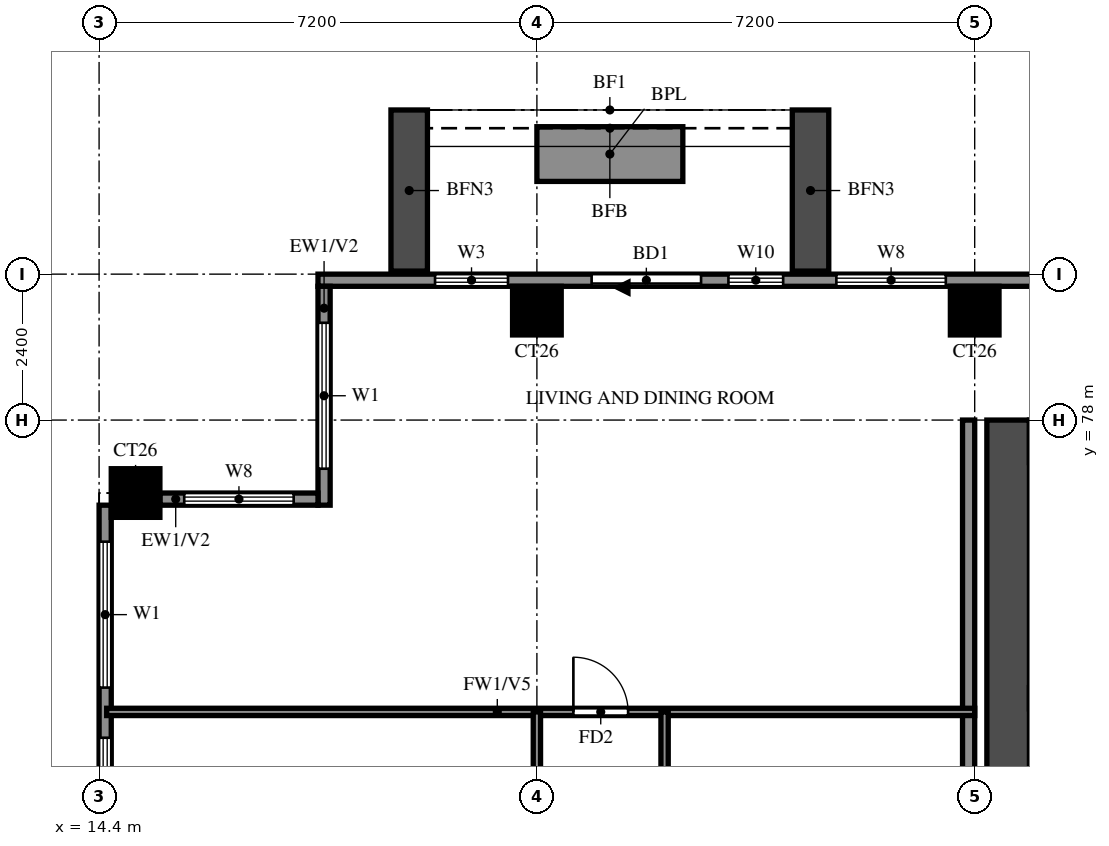
"""IFC4 building model, lengths in metres.
Left out: names, types, materials, properties, quantities, classifications, styles, units other than length and angle.
Written with IfcOpenShell. Run it as: python <this file> out.ifc"""

import sys

from ifc_helpers import new_model, si_unit, direction, frame, frame_2d, origin, origin_2d, place, context, subcontext, project, spatial, rectangle, extrude, source, transform, mapped, element, fill, save


model = new_model("IFC4")
c1 = context("Model", 3, precision=1e-05, world=origin(), true_north=direction((0.0, 1.0)))
c2 = subcontext(c1, "Body", "Model", "MODEL_VIEW")
j1 = project(units=[si_unit("LENGTHUNIT", "METRE"), si_unit("PLANEANGLEUNIT", "RADIAN")], contexts=[c1])
p1 = place(None, origin())
s1 = spatial("IfcSite", under=j1, at=p1, CompositionType="ELEMENT")
p2 = place(p1, origin())
s2 = spatial("IfcBuilding", under=s1, at=p2, CompositionType="ELEMENT")
p3 = place(p2, frame((0.0, 0.0, 195.5)))
s3 = spatial("IfcBuildingStorey", under=s2, at=p3, CompositionType="ELEMENT", Elevation=195.5)
m1 = source(origin(), c2, "Body", "SweptSolid", [
    extrude(rectangle(XDim=0.8, YDim=0.8, at=origin_2d()), origin(), (0.0, 0.0, 1.0), 3.2),
])
for number, where, z_axis, x_axis in (
    (1, (15.0, 76.8, 0.0), (0.0, 0.0, 1.0), (1.0, 0.0, 0.0)),
    (2, (21.6, 79.8, 0.0), (0.0, 0.0, 1.0), (1.0, 0.0, 0.0)),
    (3, (28.8, 79.8, 0.0), (0.0, 0.0, 1.0), (1.0, 0.0, 0.0)),
):
    element("IfcColumn", number, at=place(p3, frame(where, z_axis=z_axis, x_axis=x_axis)), inside=s3, PredefinedType="COLUMN", context=c2, shape_type="MappedRepresentation", body=[
        mapped(m1, transform((0.0, 0.0, 0.0))),
    ])
p4 = place(p3, frame((29.35, 66.1, 0.0), z_axis=(0.0, 0.0, 1.0), x_axis=(0.0, 1.0, 0.0)))
e4 = element("IfcWall", 4, at=p4, inside=s3, PredefinedType="SHEAR", context=c2, shape_type="SweptSolid", body=[
    extrude(rectangle(XDim=11.9, YDim=0.7, at=frame_2d((5.95, 0.0))), origin(), (0.0, 0.0, 1.0), 3.2),
])
p5 = place(p3, frame((82.6, 80.3, 0.0), z_axis=(0.0, 0.0, 1.0), x_axis=(-1.0, 0.0, 0.0)))
e5 = element("IfcWall", 5, at=p5, inside=s3, PredefinedType="SOLIDWALL", context=c2, shape_type="SweptSolid", body=[
    extrude(rectangle(XDim=64.6, YDim=0.2, at=frame_2d((32.3, 0.0))), origin(), (0.0, 0.0, 1.0), 3.2),
])
p6 = place(p5, frame((58.3, 0.0, 0.0)))
e6 = element("IfcOpeningElement", 6, at=p6, cuts=e5, PredefinedType="OPENING", context=c2, shape_type="SweptSolid", body=[
    extrude(rectangle(XDim=1.8, YDim=2.4, at=frame_2d((0.9, 1.2))), frame((0.0, 0.11, 0.0), z_axis=(0.0, -1.0, 0.0), x_axis=(1.0, 0.0, 0.0)), (0.0, 0.0, 1.0), 0.22),
])
p7 = place(p5, frame((54.275, 0.0, 0.6)))
e7 = element("IfcOpeningElement", 7, at=p7, cuts=e5, PredefinedType="OPENING", context=c2, shape_type="SweptSolid", body=[
    extrude(rectangle(XDim=1.8, YDim=2.4, at=frame_2d((0.9, 1.2))), frame((0.0, 0.11, 0.0), z_axis=(0.0, -1.0, 0.0), x_axis=(1.0, 0.0, 0.0)), (0.0, 0.0, 1.0), 0.22),
])
p8 = place(p5, frame((56.95, 0.0, 0.6)))
e8 = element("IfcOpeningElement", 8, at=p8, cuts=e5, PredefinedType="OPENING", context=c2, shape_type="SweptSolid", body=[
    extrude(rectangle(XDim=0.9, YDim=2.4, at=frame_2d((0.45, 1.2))), frame((0.0, 0.11, 0.0), z_axis=(0.0, -1.0, 0.0), x_axis=(1.0, 0.0, 0.0)), (0.0, 0.0, 1.0), 0.22),
])
p9 = place(p5, frame((61.475, 0.0, 0.6)))
e9 = element("IfcOpeningElement", 9, at=p9, cuts=e5, PredefinedType="OPENING", context=c2, shape_type="SweptSolid", body=[
    extrude(rectangle(XDim=1.2, YDim=2.4, at=frame_2d((0.6, 1.2))), frame((0.0, 0.11, 0.0), z_axis=(0.0, -1.0, 0.0), x_axis=(1.0, 0.0, 0.0)), (0.0, 0.0, 1.0), 0.22),
])
p10 = place(p5, frame((0.725, 0.0, 0.6)))
e10 = element("IfcOpeningElement", 10, at=p10, cuts=e5, PredefinedType="OPENING", context=c2, shape_type="SweptSolid", body=[
    extrude(rectangle(XDim=1.8, YDim=2.4, at=frame_2d((0.9, 1.2))), frame((0.0, 0.11, 0.0), z_axis=(0.0, -1.0, 0.0), x_axis=(1.0, 0.0, 0.0)), (0.0, 0.0, 1.0), 0.22),
])
p11 = place(p5, frame((4.35, 0.0, 0.6)))
e11 = element("IfcOpeningElement", 11, at=p11, cuts=e5, PredefinedType="OPENING", context=c2, shape_type="SweptSolid", body=[
    extrude(rectangle(XDim=2.4, YDim=2.4, at=frame_2d((1.2, 1.2))), frame((0.0, 0.11, 0.0), z_axis=(0.0, -1.0, 0.0), x_axis=(1.0, 0.0, 0.0)), (0.0, 0.0, 1.0), 0.22),
])
p12 = place(p5, frame((7.25, 0.0, 0.6)))
e12 = element("IfcOpeningElement", 12, at=p12, cuts=e5, PredefinedType="OPENING", context=c2, shape_type="SweptSolid", body=[
    extrude(rectangle(XDim=2.4, YDim=2.4, at=frame_2d((1.2, 1.2))), frame((0.0, 0.11, 0.0), z_axis=(0.0, -1.0, 0.0), x_axis=(1.0, 0.0, 0.0)), (0.0, 0.0, 1.0), 0.22),
])
p13 = place(p3, frame((18.1, 80.2, 0.0), z_axis=(0.0, 0.0, 1.0), x_axis=(0.0, -1.0, 0.0)))
e13 = element("IfcWall", 13, at=p13, inside=s3, PredefinedType="SOLIDWALL", context=c2, shape_type="SweptSolid", body=[
    extrude(rectangle(XDim=3.6, YDim=0.2, at=frame_2d((1.8, 0.0))), origin(), (0.0, 0.0, 1.0), 3.2),
])
p14 = place(p13, frame((0.6, 0.0, 0.6)))
e14 = element("IfcOpeningElement", 14, at=p14, cuts=e13, PredefinedType="OPENING", context=c2, shape_type="SweptSolid", body=[
    extrude(rectangle(XDim=2.4, YDim=2.4, at=frame_2d((1.2, 1.2))), frame((0.0, 0.11, 0.0), z_axis=(0.0, -1.0, 0.0), x_axis=(1.0, 0.0, 0.0)), (0.0, 0.0, 1.0), 0.22),
])
p15 = place(p3, frame((18.0, 76.7, 0.0), z_axis=(0.0, 0.0, 1.0), x_axis=(-1.0, 0.0, 0.0)))
e15 = element("IfcWall", 15, at=p15, inside=s3, PredefinedType="SOLIDWALL", context=c2, shape_type="SweptSolid", body=[
    extrude(rectangle(XDim=2.6, YDim=0.2, at=frame_2d((1.3, 0.0))), origin(), (0.0, 0.0, 1.0), 3.2),
])
p16 = place(p15, frame((0.4, 0.0, 0.6)))
e16 = element("IfcOpeningElement", 16, at=p16, cuts=e15, PredefinedType="OPENING", context=c2, shape_type="SweptSolid", body=[
    extrude(rectangle(XDim=1.8, YDim=2.4, at=frame_2d((0.9, 1.2))), frame((0.0, 0.11, 0.0), z_axis=(0.0, -1.0, 0.0), x_axis=(1.0, 0.0, 0.0)), (0.0, 0.0, 1.0), 0.22),
])
p17 = place(p3, frame((14.5, 76.6, 0.0), z_axis=(0.0, 0.0, 1.0), x_axis=(0.0, -1.0, 0.0)))
e17 = element("IfcWall", 17, at=p17, inside=s3, PredefinedType="SOLIDWALL", context=c2, shape_type="SweptSolid", body=[
    extrude(rectangle(XDim=7.0, YDim=0.2, at=frame_2d((3.5, 0.0))), origin(), (0.0, 0.0, 1.0), 3.2),
])
p18 = place(p17, frame((3.825, 0.0, 0.6)))
e18 = element("IfcOpeningElement", 18, at=p18, cuts=e17, PredefinedType="OPENING", context=c2, shape_type="SweptSolid", body=[
    extrude(rectangle(XDim=2.4, YDim=2.4, at=frame_2d((1.2, 1.2))), frame((0.0, 0.11, 0.0), z_axis=(0.0, -1.0, 0.0), x_axis=(1.0, 0.0, 0.0)), (0.0, 0.0, 1.0), 0.22),
])
p19 = place(p17, frame((0.6, 0.0, 0.6)))
e19 = element("IfcOpeningElement", 19, at=p19, cuts=e17, PredefinedType="OPENING", context=c2, shape_type="SweptSolid", body=[
    extrude(rectangle(XDim=2.4, YDim=2.4, at=frame_2d((1.2, 1.2))), frame((0.0, 0.11, 0.0), z_axis=(0.0, -1.0, 0.0), x_axis=(1.0, 0.0, 0.0)), (0.0, 0.0, 1.0), 0.22),
])
for number, where, z_axis, x_axis in (
    (20, (26.1, 80.45, 0.0), (0.0, 0.0, 1.0), (0.0, 1.0, 0.0)),
    (21, (19.5, 80.45, 0.0), (0.0, 0.0, 1.0), (0.0, 1.0, 0.0)),
):
    element("IfcWall", number, at=place(p3, frame(where, z_axis=z_axis, x_axis=x_axis)), inside=s3, PredefinedType="SOLIDWALL", context=c2, shape_type="SweptSolid", body=[
        extrude(rectangle(XDim=2.65, YDim=0.6, at=frame_2d((1.325, 0.0))), origin(), (0.0, 0.0, 1.0), 2.85),
    ])
p20 = place(p3, frame((24.0, 82.375, 0.0), z_axis=(0.0, 0.0, 1.0), x_axis=(-1.0, 0.0, 0.0)))
e22 = element("IfcWall", 22, at=p20, inside=s3, PredefinedType="SOLIDWALL", context=c2, shape_type="SweptSolid", body=[
    extrude(rectangle(XDim=2.4, YDim=0.9, at=frame_2d((1.2, 0.0))), origin(), (0.0, 0.0, 1.0), 0.9),
])
p21 = place(p3, frame((28.7, 62.4, 0.0), z_axis=(0.0, 0.0, 1.0), x_axis=(0.0, 1.0, 0.0)))
e23 = element("IfcWall", 23, at=p21, inside=s3, PredefinedType="SOLIDWALL", context=c2, shape_type="SweptSolid", body=[
    extrude(rectangle(XDim=15.6, YDim=0.2, at=frame_2d((7.8, 0.0))), origin(), (0.0, 0.0, 1.0), 3.2),
])
p22 = place(p3, frame((14.525, 73.2, 0.0), z_axis=(0.0, 0.0, 1.0), x_axis=(1.0, 0.0, 0.0)))
e24 = element("IfcWall", 24, at=p22, inside=s3, PredefinedType="PARTITIONING", context=c2, shape_type="SweptSolid", body=[
    extrude(rectangle(XDim=14.275, YDim=0.12, at=frame_2d((7.138, 0.0))), origin(), (0.0, 0.0, 1.0), 2.3),
])
p23 = place(p22, frame((7.675, 0.0, 0.0)))
e25 = element("IfcOpeningElement", 25, at=p23, cuts=e24, PredefinedType="OPENING", context=c2, shape_type="SweptSolid", body=[
    extrude(rectangle(XDim=0.9, YDim=2.1, at=frame_2d((0.45, 1.05))), frame((0.0, 0.07, 0.0), z_axis=(0.0, -1.0, 0.0), x_axis=(1.0, 0.0, 0.0)), (0.0, 0.0, 1.0), 0.14),
])
p24 = place(p3, frame((21.6, 69.6, 0.0), z_axis=(0.0, 0.0, 1.0), x_axis=(0.0, 1.0, 0.0)))
e26 = element("IfcWall", 26, at=p24, inside=s3, PredefinedType="PARTITIONING", context=c2, shape_type="SweptSolid", body=[
    extrude(rectangle(XDim=3.6, YDim=0.12, at=frame_2d((1.8, 0.0))), origin(), (0.0, 0.0, 1.0), 3.2),
])
p25 = place(p24, frame((1.35, 0.0, 0.0)))
e27 = element("IfcOpeningElement", 27, at=p25, cuts=e26, PredefinedType="OPENING", context=c2, shape_type="SweptSolid", body=[
    extrude(rectangle(XDim=0.9, YDim=2.1, at=frame_2d((0.45, 1.05))), frame((0.0, 0.07, 0.0), z_axis=(0.0, -1.0, 0.0), x_axis=(1.0, 0.0, 0.0)), (0.0, 0.0, 1.0), 0.14),
])
p26 = place(p3, frame((23.7, 64.8, 0.0), z_axis=(0.0, 0.0, 1.0), x_axis=(0.0, 1.0, 0.0)))
e28 = element("IfcWall", 28, at=p26, inside=s3, PredefinedType="PARTITIONING", context=c2, shape_type="SweptSolid", body=[
    extrude(rectangle(XDim=8.4, YDim=0.12, at=frame_2d((4.2, 0.0))), origin(), (0.0, 0.0, 1.0), 3.2),
])
p27 = place(p26, frame((6.125, 0.0, 0.0)))
e29 = element("IfcOpeningElement", 29, at=p27, cuts=e28, PredefinedType="OPENING", context=c2, shape_type="SweptSolid", body=[
    extrude(rectangle(XDim=0.8, YDim=2.1, at=frame_2d((0.4, 1.05))), frame((0.0, 0.07, 0.0), z_axis=(0.0, -1.0, 0.0), x_axis=(1.0, 0.0, 0.0)), (0.0, 0.0, 1.0), 0.14),
])
p28 = place(p6, origin())
e30 = element("IfcDoor", 30, at=p28, inside=s3, OperationType="DOUBLE_DOOR_SLIDING", PredefinedType="DOOR", context=c2, shape_type="SweptSolid", body=[
    extrude(rectangle(XDim=1.8, YDim=2.4, at=frame_2d((0.9, 1.2))), frame((0.0, 0.025, 0.0), z_axis=(0.0, -1.0, 0.0), x_axis=(1.0, 0.0, 0.0)), (0.0, 0.0, 1.0), 0.05),
])
fill(e6, e30)
p29 = place(p7, origin())
e31 = element("IfcWindow", 31, at=p29, inside=s3, PartitioningType="DOUBLE_PANEL_VERTICAL", PredefinedType="WINDOW", context=c2, shape_type="SweptSolid", body=[
    extrude(rectangle(XDim=1.8, YDim=2.4, at=frame_2d((0.9, 1.2))), frame((0.0, 0.03, 0.0), z_axis=(0.0, -1.0, 0.0), x_axis=(1.0, 0.0, 0.0)), (0.0, 0.0, 1.0), 0.06),
])
fill(e7, e31)
p30 = place(p8, origin())
e32 = element("IfcWindow", 32, at=p30, inside=s3, PartitioningType="SINGLE_PANEL", PredefinedType="WINDOW", context=c2, shape_type="SweptSolid", body=[
    extrude(rectangle(XDim=0.9, YDim=2.4, at=frame_2d((0.45, 1.2))), frame((0.0, 0.03, 0.0), z_axis=(0.0, -1.0, 0.0), x_axis=(1.0, 0.0, 0.0)), (0.0, 0.0, 1.0), 0.06),
])
fill(e8, e32)
p31 = place(p9, origin())
e33 = element("IfcWindow", 33, at=p31, inside=s3, PartitioningType="SINGLE_PANEL", PredefinedType="WINDOW", context=c2, shape_type="SweptSolid", body=[
    extrude(rectangle(XDim=1.2, YDim=2.4, at=frame_2d((0.6, 1.2))), frame((0.0, 0.03, 0.0), z_axis=(0.0, -1.0, 0.0), x_axis=(1.0, 0.0, 0.0)), (0.0, 0.0, 1.0), 0.06),
])
fill(e9, e33)
p32 = place(p14, origin())
e34 = element("IfcWindow", 34, at=p32, inside=s3, PartitioningType="DOUBLE_PANEL_VERTICAL", PredefinedType="WINDOW", context=c2, shape_type="SweptSolid", body=[
    extrude(rectangle(XDim=2.4, YDim=2.4, at=frame_2d((1.2, 1.2))), frame((0.0, 0.03, 0.0), z_axis=(0.0, -1.0, 0.0), x_axis=(1.0, 0.0, 0.0)), (0.0, 0.0, 1.0), 0.06),
])
fill(e14, e34)
p33 = place(p16, origin())
e35 = element("IfcWindow", 35, at=p33, inside=s3, PartitioningType="DOUBLE_PANEL_VERTICAL", PredefinedType="WINDOW", context=c2, shape_type="SweptSolid", body=[
    extrude(rectangle(XDim=1.8, YDim=2.4, at=frame_2d((0.9, 1.2))), frame((0.0, 0.03, 0.0), z_axis=(0.0, -1.0, 0.0), x_axis=(1.0, 0.0, 0.0)), (0.0, 0.0, 1.0), 0.06),
])
fill(e16, e35)
p34 = place(p18, origin())
e36 = element("IfcWindow", 36, at=p34, inside=s3, PartitioningType="DOUBLE_PANEL_VERTICAL", PredefinedType="WINDOW", context=c2, shape_type="SweptSolid", body=[
    extrude(rectangle(XDim=2.4, YDim=2.4, at=frame_2d((1.2, 1.2))), frame((0.0, 0.03, 0.0), z_axis=(0.0, -1.0, 0.0), x_axis=(1.0, 0.0, 0.0)), (0.0, 0.0, 1.0), 0.06),
])
fill(e18, e36)
p35 = place(p19, origin())
e37 = element("IfcWindow", 37, at=p35, inside=s3, PartitioningType="DOUBLE_PANEL_VERTICAL", PredefinedType="WINDOW", context=c2, shape_type="SweptSolid", body=[
    extrude(rectangle(XDim=2.4, YDim=2.4, at=frame_2d((1.2, 1.2))), frame((0.0, 0.03, 0.0), z_axis=(0.0, -1.0, 0.0), x_axis=(1.0, 0.0, 0.0)), (0.0, 0.0, 1.0), 0.06),
])
fill(e19, e37)
p36 = place(p23, origin())
e38 = element("IfcDoor", 38, at=p36, inside=s3, OperationType="SINGLE_SWING_LEFT", PredefinedType="DOOR", context=c2, shape_type="SweptSolid", body=[
    extrude(rectangle(XDim=0.9, YDim=2.1, at=frame_2d((0.45, 1.05))), frame((0.0, 0.025, 0.0), z_axis=(0.0, -1.0, 0.0), x_axis=(1.0, 0.0, 0.0)), (0.0, 0.0, 1.0), 0.05),
])
fill(e25, e38)
save(model, sys.argv[1])
